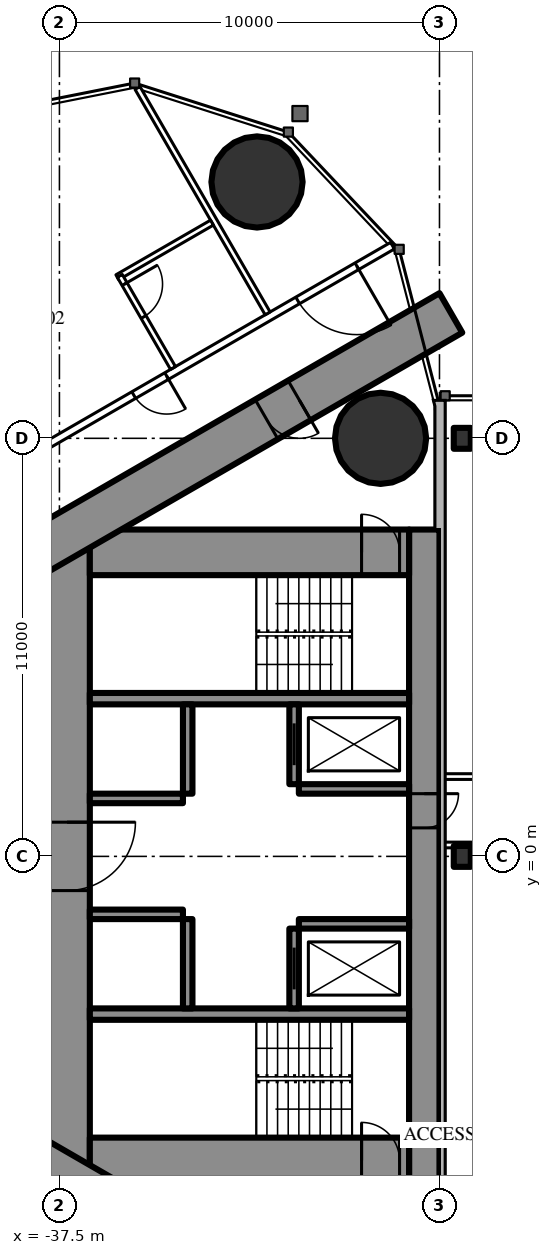
"""IFC4 building model, lengths in metres.
Left out: names, types, materials, properties, quantities, classifications, styles, units other than length and angle.
Written with IfcOpenShell. Run it as: python <this file> out.ifc"""

import sys

from ifc_helpers import new_model, si_unit, direction, frame, frame_2d, origin, origin_2d, place, context, subcontext, project, spatial, rectangle, circle, i_section, extrude, element, fill, save


model = new_model("IFC4")
c1 = context("Model", 3, precision=1e-05, world=origin(), true_north=direction((0.0, 1.0)))
c2 = subcontext(c1, "Body", "Model", "MODEL_VIEW")
j1 = project(units=[si_unit("LENGTHUNIT", "METRE"), si_unit("PLANEANGLEUNIT", "RADIAN")], contexts=[c1])
p1 = place(None, origin())
s1 = spatial("IfcSite", under=j1, at=p1, CompositionType="ELEMENT")
p2 = place(p1, origin())
s2 = spatial("IfcBuilding", under=s1, at=p2, CompositionType="ELEMENT")
p3 = place(p2, frame((0.0, 0.0, 240.5)))
s3 = spatial("IfcBuildingStorey", under=s2, at=p3, CompositionType="ELEMENT", Elevation=240.5)
for number, where, z_axis, x_axis in (
    (1, (-32.301, 17.745, 0.0), (0.0, 0.0, 1.0), (1.0, 0.0, 0.0)),
    (2, (-29.05, 11.0, 0.0), (0.0, 0.0, 1.0), (1.0, 0.0, 0.0)),
):
    element("IfcColumn", number, at=place(p3, frame(where, z_axis=z_axis, x_axis=x_axis)), inside=s3, PredefinedType="COLUMN", context=c2, shape_type="SweptSolid", body=[
        extrude(circle(Radius=1.2, at=origin_2d()), origin(), (0.0, 0.0, 1.0), 3.6),
    ])
p4 = place(p3, frame((-27.9, 8.6, 0.0), z_axis=(0.0, 0.0, 1.0), x_axis=(0.0, -1.0, 0.0)))
e3 = element("IfcWall", 3, at=p4, inside=s3, PredefinedType="SHEAR", context=c2, shape_type="SweptSolid", body=[
    extrude(rectangle(XDim=17.2, YDim=0.8, at=frame_2d((8.6, 0.0))), origin(), (0.0, 0.0, 1.0), 3.6),
])
p5 = place(p4, frame((6.95, 0.0, 0.0)))
e4 = element("IfcOpeningElement", 4, at=p5, cuts=e3, PredefinedType="OPENING", context=c2, shape_type="SweptSolid", body=[
    extrude(rectangle(XDim=0.9, YDim=2.2, at=frame_2d((0.45, 1.1))), frame((0.0, 0.41, 0.0), z_axis=(0.0, -1.0, 0.0), x_axis=(1.0, 0.0, 0.0)), (0.0, 0.0, 1.0), 0.82),
])
p6 = place(p3, frame((-37.3, 8.6, 0.0), z_axis=(0.0, 0.0, 1.0), x_axis=(0.0, -1.0, 0.0)))
e5 = element("IfcWall", 5, at=p6, inside=s3, PredefinedType="SHEAR", context=c2, shape_type="SweptSolid", body=[
    extrude(rectangle(XDim=17.2, YDim=1.2, at=frame_2d((8.6, 0.0))), origin(), (0.0, 0.0, 1.0), 3.6),
])
p7 = place(p6, frame((7.7, 0.0, 0.0)))
e6 = element("IfcOpeningElement", 6, at=p7, cuts=e5, PredefinedType="OPENING", context=c2, shape_type="SweptSolid", body=[
    extrude(rectangle(XDim=1.8, YDim=2.2, at=frame_2d((0.9, 1.1))), frame((0.0, 0.61, 0.0), z_axis=(0.0, -1.0, 0.0), x_axis=(1.0, 0.0, 0.0)), (0.0, 0.0, 1.0), 1.22),
])
p8 = place(p3, frame((-28.3, 8.0, 0.0), z_axis=(0.0, 0.0, 1.0), x_axis=(-1.0, 0.0, 0.0)))
e7 = element("IfcWall", 7, at=p8, inside=s3, PredefinedType="SHEAR", context=c2, shape_type="SweptSolid", body=[
    extrude(rectangle(XDim=8.4, YDim=1.2, at=frame_2d((4.2, 0.0))), origin(), (0.0, 0.0, 1.0), 3.6),
])
p9 = place(p8, frame((0.25, 0.0, 0.0)))
e8 = element("IfcOpeningElement", 8, at=p9, cuts=e7, PredefinedType="OPENING", context=c2, shape_type="SweptSolid", body=[
    extrude(rectangle(XDim=1.0, YDim=2.2, at=frame_2d((0.5, 1.1))), frame((0.0, 0.61, 0.0), z_axis=(0.0, -1.0, 0.0), x_axis=(1.0, 0.0, 0.0)), (0.0, 0.0, 1.0), 1.22),
])
p10 = place(p3, frame((-28.3, -8.0, 0.0), z_axis=(0.0, 0.0, 1.0), x_axis=(-1.0, 0.0, 0.0)))
e9 = element("IfcWall", 9, at=p10, inside=s3, PredefinedType="SHEAR", context=c2, shape_type="SweptSolid", body=[
    extrude(rectangle(XDim=8.4, YDim=1.2, at=frame_2d((4.2, 0.0))), origin(), (0.0, 0.0, 1.0), 3.6),
])
p11 = place(p10, frame((0.25, 0.0, 0.0)))
e10 = element("IfcOpeningElement", 10, at=p11, cuts=e9, PredefinedType="OPENING", context=c2, shape_type="SweptSolid", body=[
    extrude(rectangle(XDim=1.0, YDim=2.2, at=frame_2d((0.5, 1.1))), frame((0.0, 0.61, 0.0), z_axis=(0.0, -1.0, 0.0), x_axis=(1.0, 0.0, 0.0)), (0.0, 0.0, 1.0), 1.22),
])
for number, where, z_axis, x_axis in (
    (11, (-28.3, 4.15, 0.0), (0.0, 0.0, 1.0), (-1.0, 0.0, 0.0)),
    (12, (-28.3, -4.15, 0.0), (0.0, 0.0, 1.0), (-1.0, 0.0, 0.0)),
):
    element("IfcWall", number, at=place(p3, frame(where, z_axis=z_axis, x_axis=x_axis)), inside=s3, PredefinedType="SHEAR", context=c2, shape_type="SweptSolid", body=[
        extrude(rectangle(XDim=8.4, YDim=0.3, at=frame_2d((4.2, 0.0))), origin(), (0.0, 0.0, 1.0), 3.6),
    ])
p12 = place(p3, frame((-31.325, 4.0, 0.0), z_axis=(0.0, 0.0, 1.0), x_axis=(0.0, -1.0, 0.0)))
e13 = element("IfcWall", 13, at=p12, inside=s3, PredefinedType="SHEAR", context=c2, shape_type="SweptSolid", body=[
    extrude(rectangle(XDim=2.1, YDim=0.25, at=frame_2d((1.05, 0.0))), origin(), (0.0, 0.0, 1.0), 3.6),
])
p13 = place(p12, frame((0.5, 0.0, 0.0)))
e14 = element("IfcOpeningElement", 14, at=p13, cuts=e13, PredefinedType="OPENING", context=c2, shape_type="SweptSolid", body=[
    extrude(rectangle(XDim=1.1, YDim=2.2, at=frame_2d((0.55, 1.1))), frame((0.0, 0.135, 0.0), z_axis=(0.0, -1.0, 0.0), x_axis=(1.0, 0.0, 0.0)), (0.0, 0.0, 1.0), 0.27),
])
p14 = place(p3, frame((-34.125, 4.0, 0.0), z_axis=(0.0, 0.0, 1.0), x_axis=(0.0, -1.0, 0.0)))
e15 = element("IfcWall", 15, at=p14, inside=s3, PredefinedType="SHEAR", context=c2, shape_type="SweptSolid", body=[
    extrude(rectangle(XDim=2.35, YDim=0.25, at=frame_2d((1.175, 0.0))), origin(), (0.0, 0.0, 1.0), 3.6),
])
p15 = place(p3, frame((-28.3, 1.775, 0.0), z_axis=(0.0, 0.0, 1.0), x_axis=(-1.0, 0.0, 0.0)))
e16 = element("IfcWall", 16, at=p15, inside=s3, PredefinedType="SHEAR", context=c2, shape_type="SweptSolid", body=[
    extrude(rectangle(XDim=2.9, YDim=0.25, at=frame_2d((1.45, 0.0))), origin(), (0.0, 0.0, 1.0), 3.6),
])
p16 = place(p3, frame((-34.25, 1.525, 0.0), z_axis=(0.0, 0.0, 1.0), x_axis=(-1.0, 0.0, 0.0)))
e17 = element("IfcWall", 17, at=p16, inside=s3, PredefinedType="SHEAR", context=c2, shape_type="SweptSolid", body=[
    extrude(rectangle(XDim=2.45, YDim=0.25, at=frame_2d((1.225, 0.0))), origin(), (0.0, 0.0, 1.0), 3.6),
])
p17 = place(p3, frame((-31.325, -1.9, 0.0), z_axis=(0.0, 0.0, 1.0), x_axis=(0.0, -1.0, 0.0)))
e18 = element("IfcWall", 18, at=p17, inside=s3, PredefinedType="SHEAR", context=c2, shape_type="SweptSolid", body=[
    extrude(rectangle(XDim=2.1, YDim=0.25, at=frame_2d((1.05, 0.0))), origin(), (0.0, 0.0, 1.0), 3.6),
])
p18 = place(p17, frame((0.5, 0.0, 0.0)))
e19 = element("IfcOpeningElement", 19, at=p18, cuts=e18, PredefinedType="OPENING", context=c2, shape_type="SweptSolid", body=[
    extrude(rectangle(XDim=1.1, YDim=2.2, at=frame_2d((0.55, 1.1))), frame((0.0, 0.135, 0.0), z_axis=(0.0, -1.0, 0.0), x_axis=(1.0, 0.0, 0.0)), (0.0, 0.0, 1.0), 0.27),
])
p19 = place(p3, frame((-34.125, -1.65, 0.0), z_axis=(0.0, 0.0, 1.0), x_axis=(0.0, -1.0, 0.0)))
e20 = element("IfcWall", 20, at=p19, inside=s3, PredefinedType="SHEAR", context=c2, shape_type="SweptSolid", body=[
    extrude(rectangle(XDim=2.35, YDim=0.25, at=frame_2d((1.175, 0.0))), origin(), (0.0, 0.0, 1.0), 3.6),
])
p20 = place(p3, frame((-28.3, -1.775, 0.0), z_axis=(0.0, 0.0, 1.0), x_axis=(-1.0, 0.0, 0.0)))
e21 = element("IfcWall", 21, at=p20, inside=s3, PredefinedType="SHEAR", context=c2, shape_type="SweptSolid", body=[
    extrude(rectangle(XDim=2.9, YDim=0.25, at=frame_2d((1.45, 0.0))), origin(), (0.0, 0.0, 1.0), 3.6),
])
p21 = place(p3, frame((-34.25, -1.525, 0.0), z_axis=(0.0, 0.0, 1.0), x_axis=(-1.0, 0.0, 0.0)))
e22 = element("IfcWall", 22, at=p21, inside=s3, PredefinedType="SHEAR", context=c2, shape_type="SweptSolid", body=[
    extrude(rectangle(XDim=2.45, YDim=0.25, at=frame_2d((1.225, 0.0))), origin(), (0.0, 0.0, 1.0), 3.6),
])
p22 = place(p3, frame((-27.2, 14.3, 0.0), z_axis=(0.0, 0.0, 1.0), x_axis=(-0.866026593062, -0.499997940104, 0.0)))
e23 = element("IfcWall", 23, at=p22, inside=s3, PredefinedType="SHEAR", context=c2, shape_type="SweptSolid", body=[
    extrude(rectangle(XDim=28.946, YDim=1.2, at=frame_2d((14.473, 0.0))), origin(), (0.0, 0.0, 1.0), 3.6),
])
p23 = place(p22, frame((4.6, 0.0, 0.0)))
e24 = element("IfcOpeningElement", 24, at=p23, cuts=e23, PredefinedType="OPENING", context=c2, shape_type="SweptSolid", body=[
    extrude(rectangle(XDim=1.0, YDim=2.2, at=frame_2d((0.5, 1.1))), frame((0.0, 0.61, 0.0), z_axis=(0.0, -1.0, 0.0), x_axis=(1.0, 0.0, 0.0)), (0.0, 0.0, 1.0), 1.22),
])
p24 = place(p22, frame((13.395, 0.0, 0.0)))
e25 = element("IfcOpeningElement", 25, at=p24, cuts=e23, PredefinedType="OPENING", context=c2, shape_type="SweptSolid", body=[
    extrude(rectangle(XDim=1.8, YDim=2.2, at=frame_2d((0.9, 1.1))), frame((0.0, 0.61, 0.0), z_axis=(0.0, -1.0, 0.0), x_axis=(1.0, 0.0, 0.0)), (0.0, 0.0, 1.0), 1.22),
])
p25 = place(p3, frame((-27.2, -14.3, 0.0), z_axis=(0.0, 0.0, 1.0), x_axis=(-0.866024021859, 0.500002393557, 0.0)))
e26 = element("IfcWall", 26, at=p25, inside=s3, PredefinedType="SHEAR", context=c2, shape_type="SweptSolid", body=[
    extrude(rectangle(XDim=27.907, YDim=1.2, at=frame_2d((13.954, 0.0))), origin(), (0.0, 0.0, 1.0), 3.6),
])
p26 = place(p25, frame((4.6, 0.0, 0.0)))
e27 = element("IfcOpeningElement", 27, at=p26, cuts=e26, PredefinedType="OPENING", context=c2, shape_type="SweptSolid", body=[
    extrude(rectangle(XDim=1.0, YDim=2.2, at=frame_2d((0.5, 1.1))), frame((0.0, 0.61, 0.0), z_axis=(0.0, -1.0, 0.0), x_axis=(1.0, 0.0, 0.0)), (0.0, 0.0, 1.0), 1.22),
])
p27 = place(p25, frame((13.395, 0.0, 0.0)))
e28 = element("IfcOpeningElement", 28, at=p27, cuts=e26, PredefinedType="OPENING", context=c2, shape_type="SweptSolid", body=[
    extrude(rectangle(XDim=1.8, YDim=2.2, at=frame_2d((0.9, 1.1))), frame((0.0, 0.61, 0.0), z_axis=(0.0, -1.0, 0.0), x_axis=(1.0, 0.0, 0.0)), (0.0, 0.0, 1.0), 1.22),
])
for number, where, z_axis, x_axis in (
    (29, (-26.9, 0.0, 0.0), (0.0, 0.0, 1.0), (1.0, 0.0, 0.0)),
    (30, (-26.9, 11.0, 0.0), (0.0, 0.0, 1.0), (1.0, 0.0, 0.0)),
):
    element("IfcColumn", number, at=place(p3, frame(where, z_axis=z_axis, x_axis=x_axis)), inside=s3, PredefinedType="COLUMN", context=c2, shape_type="SweptSolid", body=[
        extrude(i_section(OverallWidth=0.448, OverallDepth=0.55, WebThickness=0.072, FlangeThickness=0.115, FilletRadius=0.02, at=origin_2d()), origin(), (0.0, 0.0, 1.0), 3.6),
    ])
p28 = place(p3, frame((-28.737, 16.068, 0.0), z_axis=(0.0, 0.0, 1.0), x_axis=(-0.866026057212, -0.499998868229, 0.0)))
e31 = element("IfcWall", 31, at=p28, inside=s3, PredefinedType="PARTITIONING", context=c2, shape_type="SweptSolid", body=[
    extrude(rectangle(XDim=32.137, YDim=0.2, at=frame_2d((16.068, 0.0))), origin(), (0.0, 0.0, 1.0), 3.35),
])
p29 = place(p28, frame((1.08, 0.0, 0.0)))
e32 = element("IfcOpeningElement", 32, at=p29, cuts=e31, PredefinedType="OPENING", context=c2, shape_type="SweptSolid", body=[
    extrude(rectangle(XDim=1.8, YDim=2.03, at=frame_2d((0.9, 1.015))), frame((0.0, 0.11, 0.0), z_axis=(0.0, -1.0, 0.0), x_axis=(1.0, 0.0, 0.0)), (0.0, 0.0, 1.0), 0.22),
])
p30 = place(p28, frame((6.86, 0.0, 0.0)))
e33 = element("IfcOpeningElement", 33, at=p30, cuts=e31, PredefinedType="OPENING", context=c2, shape_type="SweptSolid", body=[
    extrude(rectangle(XDim=1.0, YDim=2.2, at=frame_2d((0.5, 1.1))), frame((0.0, 0.11, 0.0), z_axis=(0.0, -1.0, 0.0), x_axis=(1.0, 0.0, 0.0)), (0.0, 0.0, 1.0), 0.22),
])
p31 = place(p28, frame((16.418, 0.0, 0.0)))
e34 = element("IfcOpeningElement", 34, at=p31, cuts=e31, PredefinedType="OPENING", context=c2, shape_type="SweptSolid", body=[
    extrude(rectangle(XDim=0.95, YDim=2.2, at=frame_2d((0.475, 1.1))), frame((0.0, 0.11, 0.0), z_axis=(0.0, -1.0, 0.0), x_axis=(1.0, 0.0, 0.0)), (0.0, 0.0, 1.0), 0.22),
])
p32 = place(p28, frame((20.567, 0.0, 0.0)))
e35 = element("IfcOpeningElement", 35, at=p32, cuts=e31, PredefinedType="OPENING", context=c2, shape_type="SweptSolid", body=[
    extrude(rectangle(XDim=0.95, YDim=2.2, at=frame_2d((0.475, 1.1))), frame((0.0, 0.11, 0.0), z_axis=(0.0, -1.0, 0.0), x_axis=(1.0, 0.0, 0.0)), (0.0, 0.0, 1.0), 0.22),
])
p33 = place(p28, frame((27.065, 0.0, 0.0)))
e36 = element("IfcOpeningElement", 36, at=p33, cuts=e31, PredefinedType="OPENING", context=c2, shape_type="SweptSolid", body=[
    extrude(rectangle(XDim=0.95, YDim=2.2, at=frame_2d((0.475, 1.1))), frame((0.0, 0.11, 0.0), z_axis=(0.0, -1.0, 0.0), x_axis=(1.0, 0.0, 0.0)), (0.0, 0.0, 1.0), 0.22),
])
p34 = place(p3, frame((-32.022, 14.287, 0.0), z_axis=(0.0, 0.0, 1.0), x_axis=(-0.50000019414, 0.866025291697, 0.0)))
e37 = element("IfcWall", 37, at=p34, inside=s3, PredefinedType="PARTITIONING", context=c2, shape_type="SweptSolid", body=[
    extrude(rectangle(XDim=6.848, YDim=0.15, at=frame_2d((3.424, 0.0))), origin(), (0.0, 0.0, 1.0), 3.35),
])
p35 = place(p3, frame((-33.487, 16.675, 0.0), z_axis=(0.0, 0.0, 1.0), x_axis=(-0.866039941686, -0.499974818771, 0.0)))
e38 = element("IfcWall", 38, at=p35, inside=s3, PredefinedType="PARTITIONING", context=c2, shape_type="SweptSolid", body=[
    extrude(rectangle(XDim=2.875, YDim=0.15, at=frame_2d((1.438, 0.0))), origin(), (0.0, 0.0, 1.0), 3.35),
])
p36 = place(p3, frame((-34.511, 12.85, 0.0), z_axis=(0.0, 0.0, 1.0), x_axis=(-0.500011755427, 0.866018616679, 0.0)))
e39 = element("IfcWall", 39, at=p36, inside=s3, PredefinedType="PARTITIONING", context=c2, shape_type="SweptSolid", body=[
    extrude(rectangle(XDim=2.8, YDim=0.15, at=frame_2d((1.4, 0.0))), origin(), (0.0, 0.0, 1.0), 3.35),
])
p37 = place(p36, frame((1.55, 0.0, 0.0)))
e40 = element("IfcOpeningElement", 40, at=p37, cuts=e39, PredefinedType="OPENING", context=c2, shape_type="SweptSolid", body=[
    extrude(rectangle(XDim=1.0, YDim=2.2, at=frame_2d((0.5, 1.1))), frame((0.0, 0.085, 0.0), z_axis=(0.0, -1.0, 0.0), x_axis=(1.0, 0.0, 0.0)), (0.0, 0.0, 1.0), 0.17),
])
p38 = place(p3, frame((-27.5, 0.3, 0.0), z_axis=(0.0, 0.0, 1.0), x_axis=(1.0, 0.0, 0.0)))
e41 = element("IfcWall", 41, at=p38, inside=s3, PredefinedType="PARTITIONING", context=c2, shape_type="SweptSolid", body=[
    extrude(rectangle(XDim=55.0, YDim=0.15, at=frame_2d((27.5, 0.0))), origin(), (0.0, 0.0, 1.0), 2.4),
])
p39 = place(p38, frame((1.575, 0.0, 0.0)))
e42 = element("IfcOpeningElement", 42, at=p39, cuts=e41, PredefinedType="OPENING", context=c2, shape_type="SweptSolid", body=[
    extrude(rectangle(XDim=1.0, YDim=2.2, at=frame_2d((0.5, 1.1))), frame((0.0, 0.085, 0.0), z_axis=(0.0, -1.0, 0.0), x_axis=(1.0, 0.0, 0.0)), (0.0, 0.0, 1.0), 0.17),
])
p40 = place(p38, frame((8.525, 0.0, 0.0)))
e43 = element("IfcOpeningElement", 43, at=p40, cuts=e41, PredefinedType="OPENING", context=c2, shape_type="SweptSolid", body=[
    extrude(rectangle(XDim=1.05, YDim=2.4, at=frame_2d((0.525, 1.2))), frame((0.0, 0.085, 0.0), z_axis=(0.0, -1.0, 0.0), x_axis=(1.0, 0.0, 0.0)), (0.0, 0.0, 1.0), 0.17),
])
p41 = place(p38, frame((14.025, 0.0, 0.0)))
e44 = element("IfcOpeningElement", 44, at=p41, cuts=e41, PredefinedType="OPENING", context=c2, shape_type="SweptSolid", body=[
    extrude(rectangle(XDim=1.05, YDim=2.4, at=frame_2d((0.525, 1.2))), frame((0.0, 0.085, 0.0), z_axis=(0.0, -1.0, 0.0), x_axis=(1.0, 0.0, 0.0)), (0.0, 0.0, 1.0), 0.17),
])
p42 = place(p38, frame((25.025, 0.0, 0.0)))
e45 = element("IfcOpeningElement", 45, at=p42, cuts=e41, PredefinedType="OPENING", context=c2, shape_type="SweptSolid", body=[
    extrude(rectangle(XDim=1.05, YDim=2.4, at=frame_2d((0.525, 1.2))), frame((0.0, 0.085, 0.0), z_axis=(0.0, -1.0, 0.0), x_axis=(1.0, 0.0, 0.0)), (0.0, 0.0, 1.0), 0.17),
])
p43 = place(p38, frame((30.525, 0.0, 0.0)))
e46 = element("IfcOpeningElement", 46, at=p43, cuts=e41, PredefinedType="OPENING", context=c2, shape_type="SweptSolid", body=[
    extrude(rectangle(XDim=1.05, YDim=2.4, at=frame_2d((0.525, 1.2))), frame((0.0, 0.085, 0.0), z_axis=(0.0, -1.0, 0.0), x_axis=(1.0, 0.0, 0.0)), (0.0, 0.0, 1.0), 0.17),
])
p44 = place(p38, frame((41.525, 0.0, 0.0)))
e47 = element("IfcOpeningElement", 47, at=p44, cuts=e41, PredefinedType="OPENING", context=c2, shape_type="SweptSolid", body=[
    extrude(rectangle(XDim=1.05, YDim=2.4, at=frame_2d((0.525, 1.2))), frame((0.0, 0.085, 0.0), z_axis=(0.0, -1.0, 0.0), x_axis=(1.0, 0.0, 0.0)), (0.0, 0.0, 1.0), 0.17),
])
p45 = place(p38, frame((47.025, 0.0, 0.0)))
e48 = element("IfcOpeningElement", 48, at=p45, cuts=e41, PredefinedType="OPENING", context=c2, shape_type="SweptSolid", body=[
    extrude(rectangle(XDim=1.05, YDim=2.4, at=frame_2d((0.525, 1.2))), frame((0.0, 0.085, 0.0), z_axis=(0.0, -1.0, 0.0), x_axis=(1.0, 0.0, 0.0)), (0.0, 0.0, 1.0), 0.17),
])
p46 = place(p38, frame((52.525, 0.0, 0.0)))
e49 = element("IfcOpeningElement", 49, at=p46, cuts=e41, PredefinedType="OPENING", context=c2, shape_type="SweptSolid", body=[
    extrude(rectangle(XDim=1.05, YDim=2.4, at=frame_2d((0.525, 1.2))), frame((0.0, 0.085, 0.0), z_axis=(0.0, -1.0, 0.0), x_axis=(1.0, 0.0, 0.0)), (0.0, 0.0, 1.0), 0.17),
])
p47 = place(p3, frame((-27.5, 2.1, 0.0), z_axis=(0.0, 0.0, 1.0), x_axis=(1.0, 0.0, 0.0)))
e50 = element("IfcWall", 50, at=p47, inside=s3, PredefinedType="PARTITIONING", context=c2, shape_type="SweptSolid", body=[
    extrude(rectangle(XDim=5.85, YDim=0.15, at=frame_2d((2.925, 0.0))), origin(), (0.0, 0.0, 1.0), 3.4),
])
p48 = place(p47, frame((2.025, 0.0, 0.0)))
e51 = element("IfcOpeningElement", 51, at=p48, cuts=e50, PredefinedType="OPENING", context=c2, shape_type="SweptSolid", body=[
    extrude(rectangle(XDim=1.05, YDim=2.4, at=frame_2d((0.525, 1.2))), frame((0.0, 0.085, 0.0), z_axis=(0.0, -1.0, 0.0), x_axis=(1.0, 0.0, 0.0)), (0.0, 0.0, 1.0), 0.17),
])
p49 = place(p29, origin())
e52 = element("IfcDoor", 52, at=p49, inside=s3, OperationType="DOUBLE_DOOR_SINGLE_SWING", PredefinedType="DOOR", context=c2, shape_type="SweptSolid", body=[
    extrude(rectangle(XDim=1.8, YDim=2.03, at=frame_2d((0.9, 1.015))), frame((0.0, 0.025, 0.0), z_axis=(0.0, -1.0, 0.0), x_axis=(1.0, 0.0, 0.0)), (0.0, 0.0, 1.0), 0.05),
])
fill(e32, e52)
p50 = place(p37, origin())
e53 = element("IfcDoor", 53, at=p50, inside=s3, OperationType="SINGLE_SWING_RIGHT", PredefinedType="DOOR", context=c2, shape_type="SweptSolid", body=[
    extrude(rectangle(XDim=1.0, YDim=2.2, at=frame_2d((0.5, 1.1))), frame((0.0, 0.025, 0.0), z_axis=(0.0, -1.0, 0.0), x_axis=(1.0, 0.0, 0.0)), (0.0, 0.0, 1.0), 0.05),
])
fill(e40, e53)
p51 = place(p30, origin())
e54 = element("IfcDoor", 54, at=p51, inside=s3, OperationType="SINGLE_SWING_LEFT", PredefinedType="DOOR", context=c2, shape_type="SweptSolid", body=[
    extrude(rectangle(XDim=1.0, YDim=2.2, at=frame_2d((0.5, 1.1))), frame((0.0, 0.025, 0.0), z_axis=(0.0, -1.0, 0.0), x_axis=(1.0, 0.0, 0.0)), (0.0, 0.0, 1.0), 0.05),
])
fill(e33, e54)
p52 = place(p23, origin())
e55 = element("IfcDoor", 55, at=p52, inside=s3, OperationType="SINGLE_SWING_LEFT", PredefinedType="DOOR", context=c2, shape_type="SweptSolid", body=[
    extrude(rectangle(XDim=1.0, YDim=2.2, at=frame_2d((0.5, 1.1))), frame((0.0, 0.025, 0.0), z_axis=(0.0, -1.0, 0.0), x_axis=(1.0, 0.0, 0.0)), (0.0, 0.0, 1.0), 0.05),
])
fill(e24, e55)
p53 = place(p7, origin())
e56 = element("IfcDoor", 56, at=p53, inside=s3, OperationType="DOUBLE_DOOR_SINGLE_SWING", PredefinedType="DOOR", context=c2, shape_type="SweptSolid", body=[
    extrude(rectangle(XDim=1.8, YDim=2.2, at=frame_2d((0.9, 1.1))), frame((0.0, 0.025, 0.0), z_axis=(0.0, -1.0, 0.0), x_axis=(1.0, 0.0, 0.0)), (0.0, 0.0, 1.0), 0.05),
])
fill(e6, e56)
p54 = place(p9, origin())
e57 = element("IfcDoor", 57, at=p54, inside=s3, OperationType="SINGLE_SWING_RIGHT", PredefinedType="DOOR", context=c2, shape_type="SweptSolid", body=[
    extrude(rectangle(XDim=1.0, YDim=2.2, at=frame_2d((0.5, 1.1))), frame((0.0, 0.025, 0.0), z_axis=(0.0, -1.0, 0.0), x_axis=(1.0, 0.0, 0.0)), (0.0, 0.0, 1.0), 0.05),
])
fill(e8, e57)
p55 = place(p11, origin())
e58 = element("IfcDoor", 58, at=p55, inside=s3, OperationType="SINGLE_SWING_RIGHT", PredefinedType="DOOR", context=c2, shape_type="SweptSolid", body=[
    extrude(rectangle(XDim=1.0, YDim=2.2, at=frame_2d((0.5, 1.1))), frame((0.0, 0.025, 0.0), z_axis=(0.0, -1.0, 0.0), x_axis=(1.0, 0.0, 0.0)), (0.0, 0.0, 1.0), 0.05),
])
fill(e10, e58)
p56 = place(p5, origin())
e59 = element("IfcDoor", 59, at=p56, inside=s3, OperationType="SINGLE_SWING_LEFT", PredefinedType="DOOR", context=c2, shape_type="SweptSolid", body=[
    extrude(rectangle(XDim=0.9, YDim=2.2, at=frame_2d((0.45, 1.1))), frame((0.0, 0.025, 0.0), z_axis=(0.0, -1.0, 0.0), x_axis=(1.0, 0.0, 0.0)), (0.0, 0.0, 1.0), 0.05),
])
fill(e4, e59)
p57 = place(p13, origin())
e60 = element("IfcDoor", 60, at=p57, inside=s3, OperationType="SLIDING_TO_LEFT", PredefinedType="USERDEFINED", context=c2, shape_type="SweptSolid", body=[
    extrude(rectangle(XDim=1.1, YDim=2.2, at=frame_2d((0.55, 1.1))), frame((0.0, 0.025, 0.0), z_axis=(0.0, -1.0, 0.0), x_axis=(1.0, 0.0, 0.0)), (0.0, 0.0, 1.0), 0.05),
])
fill(e14, e60)
p58 = place(p18, origin())
e61 = element("IfcDoor", 61, at=p58, inside=s3, OperationType="SLIDING_TO_LEFT", PredefinedType="USERDEFINED", context=c2, shape_type="SweptSolid", body=[
    extrude(rectangle(XDim=1.1, YDim=2.2, at=frame_2d((0.55, 1.1))), frame((0.0, 0.025, 0.0), z_axis=(0.0, -1.0, 0.0), x_axis=(1.0, 0.0, 0.0)), (0.0, 0.0, 1.0), 0.05),
])
fill(e19, e61)
save(model, sys.argv[1])
